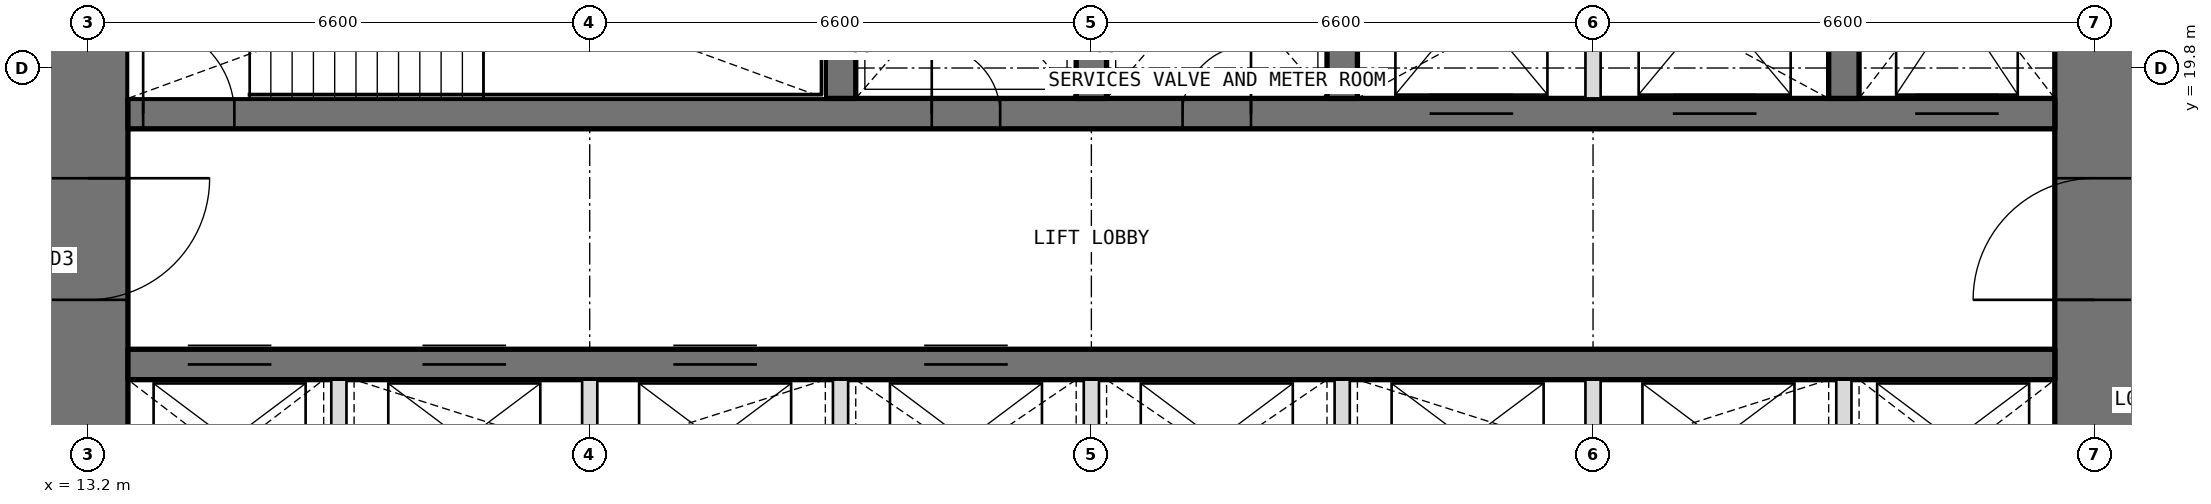
"""IFC4 building model, lengths in metres.
Left out: names, types, materials, properties, quantities, classifications, styles, units other than length and angle.
Written with IfcOpenShell. Run it as: python <this file> out.ifc"""

import sys

from ifc_helpers import new_model, si_unit, direction, frame, frame_2d, origin, place, context, subcontext, project, spatial, rectangle, extrude, element, fill, save


model = new_model("IFC4")
c1 = context("Model", 3, precision=1e-05, world=origin(), true_north=direction((0.0, 1.0)))
c2 = subcontext(c1, "Body", "Model", "MODEL_VIEW")
j1 = project(units=[si_unit("LENGTHUNIT", "METRE"), si_unit("PLANEANGLEUNIT", "RADIAN")], contexts=[c1])
p1 = place(None, origin())
s1 = spatial("IfcSite", under=j1, at=p1, CompositionType="ELEMENT")
p2 = place(p1, origin())
s2 = spatial("IfcBuilding", under=s1, at=p2, CompositionType="ELEMENT")
p3 = place(p2, frame((0.0, 0.0, 25.5)))
s3 = spatial("IfcBuildingStorey", under=s2, at=p3, CompositionType="ELEMENT", Elevation=25.5)
p4 = place(p3, frame((39.6, 13.725, 0.0), z_axis=(0.0, 0.0, 1.0), x_axis=(0.0, 1.0, 0.0)))
e1 = element("IfcWall", 1, at=p4, inside=s3, PredefinedType="SHEAR", context=c2, shape_type="SweptSolid", body=[
    extrude(rectangle(XDim=18.75, YDim=1.05, at=frame_2d((9.375, 0.0))), origin(), (0.0, 0.0, 1.0), 4.2),
])
p5 = place(p4, frame((3.025, 0.0, 0.0)))
e2 = element("IfcOpeningElement", 2, at=p5, cuts=e1, PredefinedType="OPENING", context=c2, shape_type="SweptSolid", body=[
    extrude(rectangle(XDim=1.6, YDim=2.1, at=frame_2d((0.8, 1.05))), frame((0.0, 0.535, 0.0), z_axis=(0.0, -1.0, 0.0), x_axis=(1.0, 0.0, 0.0)), (0.0, 0.0, 1.0), 1.07),
])
p6 = place(p4, frame((13.825, 0.0, 0.0)))
e3 = element("IfcOpeningElement", 3, at=p6, cuts=e1, PredefinedType="OPENING", context=c2, shape_type="SweptSolid", body=[
    extrude(rectangle(XDim=1.6, YDim=2.1, at=frame_2d((0.8, 1.05))), frame((0.0, 0.535, 0.0), z_axis=(0.0, -1.0, 0.0), x_axis=(1.0, 0.0, 0.0)), (0.0, 0.0, 1.0), 1.07),
])
p7 = place(p3, frame((13.2, 32.475, 0.0), z_axis=(0.0, 0.0, 1.0), x_axis=(0.0, -1.0, 0.0)))
e4 = element("IfcWall", 4, at=p7, inside=s3, PredefinedType="SHEAR", context=c2, shape_type="SweptSolid", body=[
    extrude(rectangle(XDim=18.75, YDim=1.05, at=frame_2d((9.375, 0.0))), origin(), (0.0, 0.0, 1.0), 4.2),
])
p8 = place(p7, frame((14.125, 0.0, 0.0)))
e5 = element("IfcOpeningElement", 5, at=p8, cuts=e4, PredefinedType="OPENING", context=c2, shape_type="SweptSolid", body=[
    extrude(rectangle(XDim=1.6, YDim=2.1, at=frame_2d((0.8, 1.05))), frame((0.0, 0.535, 0.0), z_axis=(0.0, -1.0, 0.0), x_axis=(1.0, 0.0, 0.0)), (0.0, 0.0, 1.0), 1.07),
])
p9 = place(p7, frame((3.325, 0.0, 0.0)))
e6 = element("IfcOpeningElement", 6, at=p9, cuts=e4, PredefinedType="OPENING", context=c2, shape_type="SweptSolid", body=[
    extrude(rectangle(XDim=1.6, YDim=2.1, at=frame_2d((0.8, 1.05))), frame((0.0, 0.535, 0.0), z_axis=(0.0, -1.0, 0.0), x_axis=(1.0, 0.0, 0.0)), (0.0, 0.0, 1.0), 1.07),
])
p10 = place(p3, frame((13.725, 15.9, 0.0), z_axis=(0.0, 0.0, 1.0), x_axis=(1.0, 0.0, 0.0)))
e7 = element("IfcWall", 7, at=p10, inside=s3, PredefinedType="SHEAR", context=c2, shape_type="SweptSolid", body=[
    extrude(rectangle(XDim=25.35, YDim=0.4, at=frame_2d((12.675, 0.0))), origin(), (0.0, 0.0, 1.0), 4.2),
])
p11 = place(p10, frame((0.788, 0.0, 0.0)))
e8 = element("IfcOpeningElement", 8, at=p11, cuts=e7, PredefinedType="OPENING", context=c2, shape_type="SweptSolid", body=[
    extrude(rectangle(XDim=1.1, YDim=2.1, at=frame_2d((0.55, 1.05))), frame((0.0, 0.21, 0.0), z_axis=(0.0, -1.0, 0.0), x_axis=(1.0, 0.0, 0.0)), (0.0, 0.0, 1.0), 0.42),
])
p12 = place(p10, frame((3.875, 0.0, 0.0)))
e9 = element("IfcOpeningElement", 9, at=p12, cuts=e7, PredefinedType="OPENING", context=c2, shape_type="SweptSolid", body=[
    extrude(rectangle(XDim=1.1, YDim=2.1, at=frame_2d((0.55, 1.05))), frame((0.0, 0.21, 0.0), z_axis=(0.0, -1.0, 0.0), x_axis=(1.0, 0.0, 0.0)), (0.0, 0.0, 1.0), 0.42),
])
p13 = place(p10, frame((7.175, 0.0, 0.0)))
e10 = element("IfcOpeningElement", 10, at=p13, cuts=e7, PredefinedType="OPENING", context=c2, shape_type="SweptSolid", body=[
    extrude(rectangle(XDim=1.1, YDim=2.1, at=frame_2d((0.55, 1.05))), frame((0.0, 0.21, 0.0), z_axis=(0.0, -1.0, 0.0), x_axis=(1.0, 0.0, 0.0)), (0.0, 0.0, 1.0), 0.42),
])
p14 = place(p10, frame((10.475, 0.0, 0.0)))
e11 = element("IfcOpeningElement", 11, at=p14, cuts=e7, PredefinedType="OPENING", context=c2, shape_type="SweptSolid", body=[
    extrude(rectangle(XDim=1.1, YDim=2.1, at=frame_2d((0.55, 1.05))), frame((0.0, 0.21, 0.0), z_axis=(0.0, -1.0, 0.0), x_axis=(1.0, 0.0, 0.0)), (0.0, 0.0, 1.0), 0.42),
])
p15 = place(p3, frame((13.725, 19.2, 0.0), z_axis=(0.0, 0.0, 1.0), x_axis=(1.0, 0.0, 0.0)))
e12 = element("IfcWall", 12, at=p15, inside=s3, PredefinedType="SHEAR", context=c2, shape_type="SweptSolid", body=[
    extrude(rectangle(XDim=25.35, YDim=0.4, at=frame_2d((12.675, 0.0))), origin(), (0.0, 0.0, 1.0), 4.2),
])
p16 = place(p15, frame((10.575, 0.0, 0.0)))
e13 = element("IfcOpeningElement", 13, at=p16, cuts=e12, PredefinedType="OPENING", context=c2, shape_type="SweptSolid", body=[
    extrude(rectangle(XDim=0.9, YDim=2.1, at=frame_2d((0.45, 1.05))), frame((0.0, 0.21, 0.0), z_axis=(0.0, -1.0, 0.0), x_axis=(1.0, 0.0, 0.0)), (0.0, 0.0, 1.0), 0.42),
])
p17 = place(p15, frame((13.875, 0.0, 0.0)))
e14 = element("IfcOpeningElement", 14, at=p17, cuts=e12, PredefinedType="OPENING", context=c2, shape_type="SweptSolid", body=[
    extrude(rectangle(XDim=0.9, YDim=2.1, at=frame_2d((0.45, 1.05))), frame((0.0, 0.21, 0.0), z_axis=(0.0, -1.0, 0.0), x_axis=(1.0, 0.0, 0.0)), (0.0, 0.0, 1.0), 0.42),
])
p18 = place(p15, frame((0.2, 0.0, 0.0)))
e15 = element("IfcOpeningElement", 15, at=p18, cuts=e12, PredefinedType="OPENING", context=c2, shape_type="SweptSolid", body=[
    extrude(rectangle(XDim=1.2, YDim=2.1, at=frame_2d((0.6, 1.05))), frame((0.0, 0.21, 0.0), z_axis=(0.0, -1.0, 0.0), x_axis=(1.0, 0.0, 0.0)), (0.0, 0.0, 1.0), 0.42),
])
p19 = place(p15, frame((23.512, 0.0, 0.0)))
e16 = element("IfcOpeningElement", 16, at=p19, cuts=e12, PredefinedType="OPENING", context=c2, shape_type="SweptSolid", body=[
    extrude(rectangle(XDim=1.1, YDim=2.1, at=frame_2d((0.55, 1.05))), frame((0.0, 0.21, 0.0), z_axis=(0.0, -1.0, 0.0), x_axis=(1.0, 0.0, 0.0)), (0.0, 0.0, 1.0), 0.42),
])
p20 = place(p15, frame((17.125, 0.0, 0.0)))
e17 = element("IfcOpeningElement", 17, at=p20, cuts=e12, PredefinedType="OPENING", context=c2, shape_type="SweptSolid", body=[
    extrude(rectangle(XDim=1.1, YDim=2.1, at=frame_2d((0.55, 1.05))), frame((0.0, 0.21, 0.0), z_axis=(0.0, -1.0, 0.0), x_axis=(1.0, 0.0, 0.0)), (0.0, 0.0, 1.0), 0.42),
])
p21 = place(p15, frame((20.325, 0.0, 0.0)))
e18 = element("IfcOpeningElement", 18, at=p21, cuts=e12, PredefinedType="OPENING", context=c2, shape_type="SweptSolid", body=[
    extrude(rectangle(XDim=1.1, YDim=2.1, at=frame_2d((0.55, 1.05))), frame((0.0, 0.21, 0.0), z_axis=(0.0, -1.0, 0.0), x_axis=(1.0, 0.0, 0.0)), (0.0, 0.0, 1.0), 0.42),
])
for number, where, z_axis, x_axis in (
    (19, (23.1, 19.4, 0.0), (0.0, 0.0, 1.0), (0.0, 1.0, 0.0)),
    (20, (26.4, 19.4, 0.0), (0.0, 0.0, 1.0), (0.0, 1.0, 0.0)),
    (21, (29.7, 19.4, 0.0), (0.0, 0.0, 1.0), (0.0, 1.0, 0.0)),
    (22, (36.3, 19.4, 0.0), (0.0, 0.0, 1.0), (0.0, 1.0, 0.0)),
):
    element("IfcWall", number, at=place(p3, frame(where, z_axis=z_axis, x_axis=x_axis)), inside=s3, PredefinedType="SHEAR", context=c2, shape_type="SweptSolid", body=[
        extrude(rectangle(XDim=3.35, YDim=0.4, at=frame_2d((1.675, 0.0))), origin(), (0.0, 0.0, 1.0), 4.2),
    ])
for number, where, z_axis, x_axis in (
    (23, (16.5, 13.725, 0.0), (0.0, 0.0, 1.0), (0.0, 1.0, 0.0)),
    (24, (19.8, 13.725, 0.0), (0.0, 0.0, 1.0), (0.0, 1.0, 0.0)),
    (25, (23.1, 13.725, 0.0), (0.0, 0.0, 1.0), (0.0, 1.0, 0.0)),
    (26, (26.4, 13.725, 0.0), (0.0, 0.0, 1.0), (0.0, 1.0, 0.0)),
    (27, (29.7, 13.725, 0.0), (0.0, 0.0, 1.0), (0.0, 1.0, 0.0)),
    (28, (33.0, 13.725, 0.0), (0.0, 0.0, 1.0), (0.0, 1.0, 0.0)),
    (29, (36.3, 13.725, 0.0), (0.0, 0.0, 1.0), (0.0, 1.0, 0.0)),
):
    element("IfcWall", number, at=place(p3, frame(where, z_axis=z_axis, x_axis=x_axis)), inside=s3, PredefinedType="PARTITIONING", context=c2, shape_type="SweptSolid", body=[
        extrude(rectangle(XDim=1.975, YDim=0.2, at=frame_2d((0.987, 0.0))), origin(), (0.0, 0.0, 1.0), 4.2),
    ])
p22 = place(p3, frame((33.0, 19.4, 0.0), z_axis=(0.0, 0.0, 1.0), x_axis=(0.0, 1.0, 0.0)))
e30 = element("IfcWall", 30, at=p22, inside=s3, PredefinedType="PARTITIONING", context=c2, shape_type="SweptSolid", body=[
    extrude(rectangle(XDim=3.35, YDim=0.2, at=frame_2d((1.675, 0.0))), origin(), (0.0, 0.0, 1.0), 4.2),
])
p23 = place(p16, origin())
e31 = element("IfcDoor", 31, at=p23, inside=s3, OperationType="SINGLE_SWING_LEFT", PredefinedType="DOOR", context=c2, shape_type="SweptSolid", body=[
    extrude(rectangle(XDim=0.9, YDim=2.1, at=frame_2d((0.45, 1.05))), frame((0.0, 0.025, 0.0), z_axis=(0.0, -1.0, 0.0), x_axis=(1.0, 0.0, 0.0)), (0.0, 0.0, 1.0), 0.05),
])
fill(e13, e31)
p24 = place(p17, origin())
e32 = element("IfcDoor", 32, at=p24, inside=s3, OperationType="SINGLE_SWING_RIGHT", PredefinedType="DOOR", context=c2, shape_type="SweptSolid", body=[
    extrude(rectangle(XDim=0.9, YDim=2.1, at=frame_2d((0.45, 1.05))), frame((0.0, 0.025, 0.0), z_axis=(0.0, -1.0, 0.0), x_axis=(1.0, 0.0, 0.0)), (0.0, 0.0, 1.0), 0.05),
])
fill(e14, e32)
p25 = place(p18, origin())
e33 = element("IfcDoor", 33, at=p25, inside=s3, OperationType="SINGLE_SWING_LEFT", PredefinedType="DOOR", context=c2, shape_type="SweptSolid", body=[
    extrude(rectangle(XDim=1.2, YDim=2.1, at=frame_2d((0.6, 1.05))), frame((0.0, 0.025, 0.0), z_axis=(0.0, -1.0, 0.0), x_axis=(1.0, 0.0, 0.0)), (0.0, 0.0, 1.0), 0.05),
])
fill(e15, e33)
p26 = place(p8, origin())
e34 = element("IfcDoor", 34, at=p26, inside=s3, OperationType="DOUBLE_DOOR_DOUBLE_SWING", PredefinedType="DOOR", context=c2, shape_type="SweptSolid", body=[
    extrude(rectangle(XDim=1.6, YDim=2.1, at=frame_2d((0.8, 1.05))), frame((0.0, 0.025, 0.0), z_axis=(0.0, -1.0, 0.0), x_axis=(1.0, 0.0, 0.0)), (0.0, 0.0, 1.0), 0.05),
])
fill(e5, e34)
p27 = place(p5, origin())
e35 = element("IfcDoor", 35, at=p27, inside=s3, OperationType="DOUBLE_DOOR_DOUBLE_SWING", PredefinedType="DOOR", context=c2, shape_type="SweptSolid", body=[
    extrude(rectangle(XDim=1.6, YDim=2.1, at=frame_2d((0.8, 1.05))), frame((0.0, 0.025, 0.0), z_axis=(0.0, -1.0, 0.0), x_axis=(1.0, 0.0, 0.0)), (0.0, 0.0, 1.0), 0.05),
])
fill(e2, e35)
p28 = place(p11, origin())
e36 = element("IfcDoor", 36, at=p28, inside=s3, OperationType="DOUBLE_DOOR_SLIDING", PredefinedType="DOOR", context=c2, shape_type="SweptSolid", body=[
    extrude(rectangle(XDim=1.1, YDim=2.1, at=frame_2d((0.55, 1.05))), frame((0.0, 0.025, 0.0), z_axis=(0.0, -1.0, 0.0), x_axis=(1.0, 0.0, 0.0)), (0.0, 0.0, 1.0), 0.05),
])
fill(e8, e36)
p29 = place(p12, origin())
e37 = element("IfcDoor", 37, at=p29, inside=s3, OperationType="DOUBLE_DOOR_SLIDING", PredefinedType="DOOR", context=c2, shape_type="SweptSolid", body=[
    extrude(rectangle(XDim=1.1, YDim=2.1, at=frame_2d((0.55, 1.05))), frame((0.0, 0.025, 0.0), z_axis=(0.0, -1.0, 0.0), x_axis=(1.0, 0.0, 0.0)), (0.0, 0.0, 1.0), 0.05),
])
fill(e9, e37)
p30 = place(p13, origin())
e38 = element("IfcDoor", 38, at=p30, inside=s3, OperationType="DOUBLE_DOOR_SLIDING", PredefinedType="DOOR", context=c2, shape_type="SweptSolid", body=[
    extrude(rectangle(XDim=1.1, YDim=2.1, at=frame_2d((0.55, 1.05))), frame((0.0, 0.025, 0.0), z_axis=(0.0, -1.0, 0.0), x_axis=(1.0, 0.0, 0.0)), (0.0, 0.0, 1.0), 0.05),
])
fill(e10, e38)
p31 = place(p14, origin())
e39 = element("IfcDoor", 39, at=p31, inside=s3, OperationType="DOUBLE_DOOR_SLIDING", PredefinedType="DOOR", context=c2, shape_type="SweptSolid", body=[
    extrude(rectangle(XDim=1.1, YDim=2.1, at=frame_2d((0.55, 1.05))), frame((0.0, 0.025, 0.0), z_axis=(0.0, -1.0, 0.0), x_axis=(1.0, 0.0, 0.0)), (0.0, 0.0, 1.0), 0.05),
])
fill(e11, e39)
p32 = place(p19, origin())
e40 = element("IfcDoor", 40, at=p32, inside=s3, OperationType="DOUBLE_DOOR_SLIDING", PredefinedType="DOOR", context=c2, shape_type="SweptSolid", body=[
    extrude(rectangle(XDim=1.1, YDim=2.1, at=frame_2d((0.55, 1.05))), frame((0.0, 0.025, 0.0), z_axis=(0.0, -1.0, 0.0), x_axis=(1.0, 0.0, 0.0)), (0.0, 0.0, 1.0), 0.05),
])
fill(e16, e40)
p33 = place(p20, origin())
e41 = element("IfcDoor", 41, at=p33, inside=s3, OperationType="DOUBLE_DOOR_SLIDING", PredefinedType="DOOR", context=c2, shape_type="SweptSolid", body=[
    extrude(rectangle(XDim=1.1, YDim=2.1, at=frame_2d((0.55, 1.05))), frame((0.0, 0.025, 0.0), z_axis=(0.0, -1.0, 0.0), x_axis=(1.0, 0.0, 0.0)), (0.0, 0.0, 1.0), 0.05),
])
fill(e17, e41)
p34 = place(p21, origin())
e42 = element("IfcDoor", 42, at=p34, inside=s3, OperationType="DOUBLE_DOOR_SLIDING", PredefinedType="DOOR", context=c2, shape_type="SweptSolid", body=[
    extrude(rectangle(XDim=1.1, YDim=2.1, at=frame_2d((0.55, 1.05))), frame((0.0, 0.025, 0.0), z_axis=(0.0, -1.0, 0.0), x_axis=(1.0, 0.0, 0.0)), (0.0, 0.0, 1.0), 0.05),
])
fill(e18, e42)
save(model, sys.argv[1])
